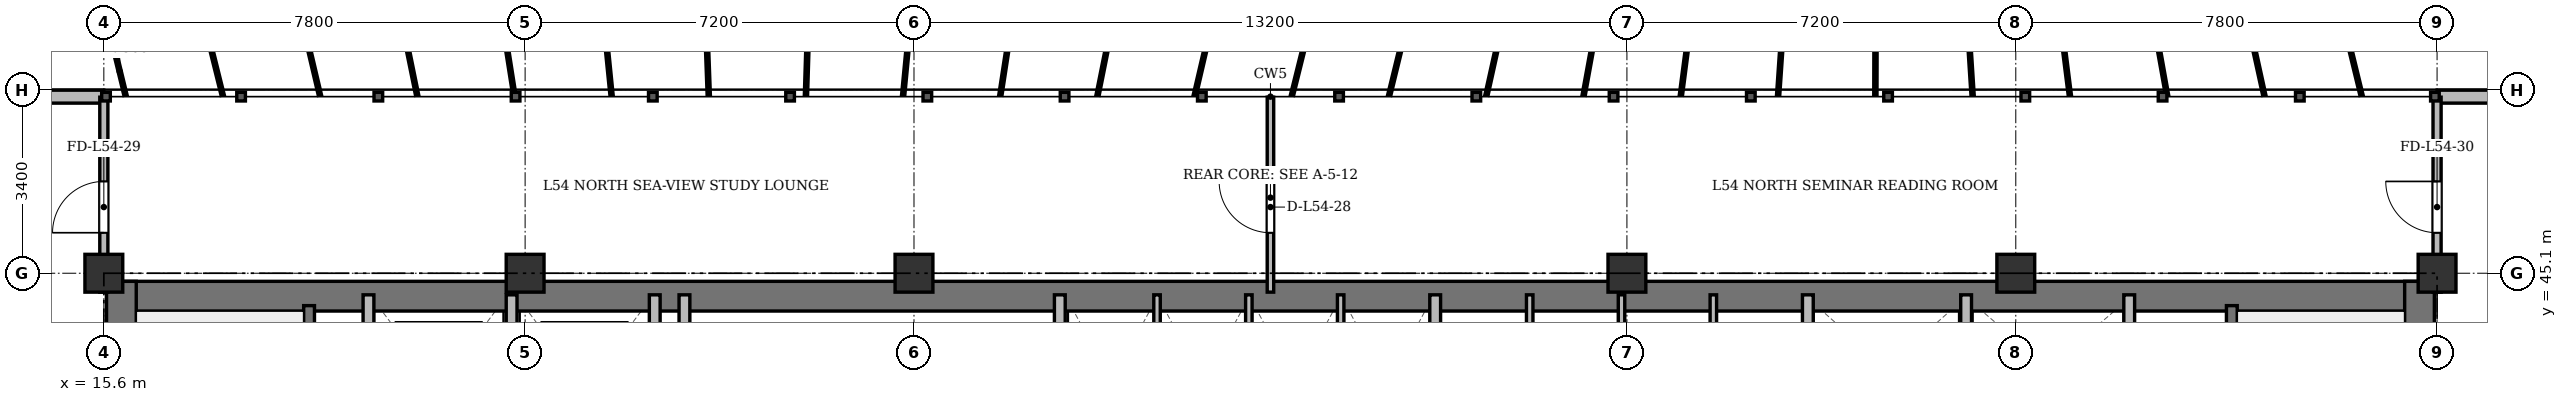
"""IFC4 building model, lengths in metres.
Left out: names, types, materials, properties, quantities, classifications, styles, units other than length and angle.
Written with IfcOpenShell. Run it as: python <this file> out.ifc"""

import sys

from ifc_helpers import new_model, si_unit, direction, frame, frame_2d, origin, origin_2d, place, context, subcontext, project, spatial, rectangle, extrude, source, transform, mapped, element, fill, save


model = new_model("IFC4")
c1 = context("Model", 3, precision=1e-05, world=origin(), true_north=direction((0.0, 1.0)))
c2 = subcontext(c1, "Body", "Model", "MODEL_VIEW")
j1 = project(units=[si_unit("LENGTHUNIT", "METRE"), si_unit("PLANEANGLEUNIT", "RADIAN")], contexts=[c1])
p1 = place(None, origin())
s1 = spatial("IfcSite", under=j1, at=p1, CompositionType="ELEMENT")
p2 = place(p1, origin())
s2 = spatial("IfcBuilding", under=s1, at=p2, CompositionType="ELEMENT")
p3 = place(p2, frame((0.0, 0.0, 208.5)))
s3 = spatial("IfcBuildingStorey", under=s2, at=p3, CompositionType="ELEMENT", Elevation=208.5)
m1 = source(origin(), c2, "Body", "SweptSolid", [
    extrude(rectangle(XDim=0.7, YDim=0.7, at=origin_2d()), origin(), (0.0, 0.0, 1.0), 3.6),
])
for number, where, z_axis, x_axis in (
    (1, (15.6, 45.1, 0.0), (0.0, 0.0, 1.0), (1.0, 0.0, 0.0)),
    (2, (23.4, 45.1, 0.0), (0.0, 0.0, 1.0), (1.0, 0.0, 0.0)),
    (3, (30.6, 45.1, 0.0), (0.0, 0.0, 1.0), (1.0, 0.0, 0.0)),
    (4, (43.8, 45.1, 0.0), (0.0, 0.0, 1.0), (1.0, 0.0, 0.0)),
    (5, (51.0, 45.1, 0.0), (0.0, 0.0, 1.0), (1.0, 0.0, 0.0)),
    (6, (58.8, 45.1, 0.0), (0.0, 0.0, 1.0), (1.0, 0.0, 0.0)),
):
    element("IfcColumn", number, at=place(p3, frame(where, z_axis=z_axis, x_axis=x_axis)), inside=s3, PredefinedType="COLUMN", context=c2, shape_type="MappedRepresentation", body=[
        mapped(m1, transform((0.0, 0.0, 0.0), x_axis=(1.0, 0.0, 0.0), y_axis=(0.0, 1.0, 0.0), z_axis=(0.0, 0.0, 1.0), scale=1.0)),
    ])
p4 = place(p3, frame((11.1, 48.37, 0.0), z_axis=(0.0, 0.0, 1.0), x_axis=(1.0, 0.0, 0.0)))
e7 = element("IfcWall", 7, at=p4, inside=s3, PredefinedType="SOLIDWALL", context=c2, shape_type="SweptSolid", body=[
    extrude(rectangle(XDim=4.5, YDim=0.24, at=frame_2d((2.25, 0.0))), origin(), (0.0, 0.0, 1.0), 3.36),
])
p5 = place(p4, frame((1.983, 0.0, 0.9)))
e8 = element("IfcOpeningElement", 8, at=p5, cuts=e7, PredefinedType="OPENING", context=c2, shape_type="SweptSolid", body=[
    extrude(rectangle(XDim=1.2, YDim=1.65, at=frame_2d((0.6, 0.825))), frame((0.0, 0.13, 0.0), z_axis=(0.0, -1.0, 0.0), x_axis=(1.0, 0.0, 0.0)), (0.0, 0.0, 1.0), 0.26),
])
p6 = place(p3, frame((58.8, 48.37, 0.0), z_axis=(0.0, 0.0, 1.0), x_axis=(1.0, 0.0, 0.0)))
e9 = element("IfcWall", 9, at=p6, inside=s3, PredefinedType="SOLIDWALL", context=c2, shape_type="SweptSolid", body=[
    extrude(rectangle(XDim=4.5, YDim=0.24, at=frame_2d((2.25, 0.0))), origin(), (0.0, 0.0, 1.0), 3.36),
])
p7 = place(p6, frame((1.318, 0.0, 0.9)))
e10 = element("IfcOpeningElement", 10, at=p7, cuts=e9, PredefinedType="OPENING", context=c2, shape_type="SweptSolid", body=[
    extrude(rectangle(XDim=1.2, YDim=1.65, at=frame_2d((0.6, 0.825))), frame((0.0, 0.13, 0.0), z_axis=(0.0, -1.0, 0.0), x_axis=(1.0, 0.0, 0.0)), (0.0, 0.0, 1.0), 0.26),
])
p8 = place(p3, frame((15.65, 44.675, 0.0), z_axis=(0.0, 0.0, 1.0), x_axis=(1.0, 0.0, 0.0)))
e11 = element("IfcWall", 11, at=p8, inside=s3, PredefinedType="SHEAR", context=c2, shape_type="SweptSolid", body=[
    extrude(rectangle(XDim=43.1, YDim=0.55, at=frame_2d((21.55, 0.0))), origin(), (0.0, 0.0, 1.0), 3.36),
])
for number, where, z_axis, x_axis in (
    (12, (15.925, 33.4, 0.0), (0.0, 0.0, 1.0), (0.0, 1.0, 0.0)),
    (13, (58.475, 33.4, 0.0), (0.0, 0.0, 1.0), (0.0, 1.0, 0.0)),
):
    element("IfcWall", number, at=place(p3, frame(where, z_axis=z_axis, x_axis=x_axis)), inside=s3, PredefinedType="SHEAR", context=c2, shape_type="SweptSolid", body=[
        extrude(rectangle(XDim=11.55, YDim=0.55, at=frame_2d((5.775, 0.0))), origin(), (0.0, 0.0, 1.0), 3.36),
    ])
p9 = place(p3, frame((19.4, 33.4, 0.0), z_axis=(0.0, 0.0, 1.0), x_axis=(0.0, 1.0, 0.0)))
e14 = element("IfcWall", 14, at=p9, inside=s3, PredefinedType="SHEAR", context=c2, shape_type="SweptSolid", body=[
    extrude(rectangle(XDim=11.1, YDim=0.2, at=frame_2d((5.55, 0.0))), origin(), (0.0, 0.0, 1.0), 3.36),
])
p10 = place(p9, frame((0.85, 0.0, 0.0)))
e15 = element("IfcOpeningElement", 15, at=p10, cuts=e14, PredefinedType="OPENING", context=c2, shape_type="SweptSolid", body=[
    extrude(rectangle(XDim=1.1, YDim=2.15, at=frame_2d((0.55, 1.075))), frame((0.0, 0.11, 0.0), z_axis=(0.0, -1.0, 0.0), x_axis=(1.0, 0.0, 0.0)), (0.0, 0.0, 1.0), 0.22),
])
p11 = place(p3, frame((55.0, 33.4, 0.0), z_axis=(0.0, 0.0, 1.0), x_axis=(0.0, 1.0, 0.0)))
e16 = element("IfcWall", 16, at=p11, inside=s3, PredefinedType="SHEAR", context=c2, shape_type="SweptSolid", body=[
    extrude(rectangle(XDim=11.1, YDim=0.2, at=frame_2d((5.55, 0.0))), origin(), (0.0, 0.0, 1.0), 3.36),
])
p12 = place(p11, frame((0.85, 0.0, 0.0)))
e17 = element("IfcOpeningElement", 17, at=p12, cuts=e16, PredefinedType="OPENING", context=c2, shape_type="SweptSolid", body=[
    extrude(rectangle(XDim=1.1, YDim=2.15, at=frame_2d((0.55, 1.075))), frame((0.0, 0.11, 0.0), z_axis=(0.0, -1.0, 0.0), x_axis=(1.0, 0.0, 0.0)), (0.0, 0.0, 1.0), 0.22),
])
for number, where, z_axis, x_axis in (
    (18, (20.5, 41.3, 0.0), (0.0, 0.0, 1.0), (0.0, 1.0, 0.0)),
    (19, (23.15, 41.3, 0.0), (0.0, 0.0, 1.0), (0.0, 1.0, 0.0)),
    (20, (25.8, 41.3, 0.0), (0.0, 0.0, 1.0), (0.0, 1.0, 0.0)),
):
    element("IfcWall", number, at=place(p3, frame(where, z_axis=z_axis, x_axis=x_axis)), inside=s3, PredefinedType="SOLIDWALL", context=c2, shape_type="SweptSolid", body=[
        extrude(rectangle(XDim=3.4, YDim=0.2, at=frame_2d((1.7, 0.0))), origin(), (0.0, 0.0, 1.0), 3.36),
    ])
for number, where, z_axis, x_axis in (
    (21, (26.35, 33.4, 0.0), (0.0, 0.0, 1.0), (0.0, 1.0, 0.0)),
    (22, (33.3, 33.4, 0.0), (0.0, 0.0, 1.0), (0.0, 1.0, 0.0)),
):
    element("IfcWall", number, at=place(p3, frame(where, z_axis=z_axis, x_axis=x_axis)), inside=s3, PredefinedType="SOLIDWALL", context=c2, shape_type="SweptSolid", body=[
        extrude(rectangle(XDim=11.3, YDim=0.2, at=frame_2d((5.65, 0.0))), origin(), (0.0, 0.0, 1.0), 2.91),
    ])
for number, where, z_axis, x_axis in (
    (23, (35.1, 41.5, 0.0), (0.0, 0.0, 1.0), (0.0, 1.0, 0.0)),
    (24, (36.8, 41.5, 0.0), (0.0, 0.0, 1.0), (0.0, 1.0, 0.0)),
    (25, (38.5, 41.5, 0.0), (0.0, 0.0, 1.0), (0.0, 1.0, 0.0)),
):
    element("IfcWall", number, at=place(p3, frame(where, z_axis=z_axis, x_axis=x_axis)), inside=s3, PredefinedType="PARTITIONING", context=c2, shape_type="SweptSolid", body=[
        extrude(rectangle(XDim=3.2, YDim=0.12, at=frame_2d((1.6, 0.0))), origin(), (0.0, 0.0, 1.0), 3.36),
    ])
p13 = place(p3, frame((40.25, 41.5, 0.0), z_axis=(0.0, 0.0, 1.0), x_axis=(0.0, 1.0, 0.0)))
e26 = element("IfcWall", 26, at=p13, inside=s3, PredefinedType="SOLIDWALL", context=c2, shape_type="SweptSolid", body=[
    extrude(rectangle(XDim=3.2, YDim=0.2, at=frame_2d((1.6, 0.0))), origin(), (0.0, 0.0, 1.0), 3.36),
])
p14 = place(p3, frame((42.0, 41.5, 0.0), z_axis=(0.0, 0.0, 1.0), x_axis=(0.0, 1.0, 0.0)))
e27 = element("IfcWall", 27, at=p14, inside=s3, PredefinedType="PARTITIONING", context=c2, shape_type="SweptSolid", body=[
    extrude(rectangle(XDim=3.2, YDim=0.12, at=frame_2d((1.6, 0.0))), origin(), (0.0, 0.0, 1.0), 3.36),
])
p15 = place(p3, frame((43.7, 41.5, 0.0), z_axis=(0.0, 0.0, 1.0), x_axis=(0.0, 1.0, 0.0)))
e28 = element("IfcWall", 28, at=p15, inside=s3, PredefinedType="PARTITIONING", context=c2, shape_type="SweptSolid", body=[
    extrude(rectangle(XDim=3.2, YDim=0.12, at=frame_2d((1.6, 0.0))), origin(), (0.0, 0.0, 1.0), 2.86),
])
p16 = place(p3, frame((45.4, 41.5, 0.0), z_axis=(0.0, 0.0, 1.0), x_axis=(0.0, 1.0, 0.0)))
e29 = element("IfcWall", 29, at=p16, inside=s3, PredefinedType="PARTITIONING", context=c2, shape_type="SweptSolid", body=[
    extrude(rectangle(XDim=3.2, YDim=0.12, at=frame_2d((1.6, 0.0))), origin(), (0.0, 0.0, 1.0), 3.36),
])
p17 = place(p3, frame((47.15, 33.4, 0.0), z_axis=(0.0, 0.0, 1.0), x_axis=(0.0, 1.0, 0.0)))
e30 = element("IfcWall", 30, at=p17, inside=s3, PredefinedType="SOLIDWALL", context=c2, shape_type="SweptSolid", body=[
    extrude(rectangle(XDim=11.3, YDim=0.2, at=frame_2d((5.65, 0.0))), origin(), (0.0, 0.0, 1.0), 2.91),
])
for number, where, z_axis, x_axis in (
    (31, (50.08, 42.05, 0.0), (0.0, 0.0, 1.0), (0.0, 1.0, 0.0)),
    (32, (53.1, 42.05, 0.0), (0.0, 0.0, 1.0), (0.0, 1.0, 0.0)),
):
    element("IfcWall", number, at=place(p3, frame(where, z_axis=z_axis, x_axis=x_axis)), inside=s3, PredefinedType="SOLIDWALL", context=c2, shape_type="SweptSolid", body=[
        extrude(rectangle(XDim=2.65, YDim=0.2, at=frame_2d((1.325, 0.0))), origin(), (0.0, 0.0, 1.0), 3.36),
    ])
p18 = place(p3, frame((37.2, 44.75, 0.0), z_axis=(0.0, 0.0, 1.0), x_axis=(0.0, 1.0, 0.0)))
e33 = element("IfcWall", 33, at=p18, inside=s3, PredefinedType="PARTITIONING", context=c2, shape_type="SweptSolid", body=[
    extrude(rectangle(XDim=3.61, YDim=0.12, at=frame_2d((1.805, 0.0))), origin(), (0.0, 0.0, 1.0), 2.91),
])
p19 = place(p18, frame((1.1, 0.0, 0.0)))
e34 = element("IfcOpeningElement", 34, at=p19, cuts=e33, PredefinedType="OPENING", context=c2, shape_type="SweptSolid", body=[
    extrude(rectangle(XDim=0.95, YDim=2.15, at=frame_2d((0.475, 1.075))), frame((0.0, 0.07, 0.0), z_axis=(0.0, -1.0, 0.0), x_axis=(1.0, 0.0, 0.0)), (0.0, 0.0, 1.0), 0.14),
])
p20 = place(p3, frame((15.6, 44.75, 0.0), z_axis=(0.0, 0.0, 1.0), x_axis=(0.0, 1.0, 0.0)))
e35 = element("IfcWall", 35, at=p20, inside=s3, PredefinedType="PARTITIONING", context=c2, shape_type="SweptSolid", body=[
    extrude(rectangle(XDim=3.61, YDim=0.15, at=frame_2d((1.805, 0.0))), origin(), (0.0, 0.0, 1.0), 2.86),
])
p21 = place(p20, frame((1.1, 0.0, 0.0)))
e36 = element("IfcOpeningElement", 36, at=p21, cuts=e35, PredefinedType="OPENING", context=c2, shape_type="SweptSolid", body=[
    extrude(rectangle(XDim=0.95, YDim=2.15, at=frame_2d((0.475, 1.075))), frame((0.0, 0.085, 0.0), z_axis=(0.0, -1.0, 0.0), x_axis=(1.0, 0.0, 0.0)), (0.0, 0.0, 1.0), 0.17),
])
p22 = place(p3, frame((58.8, 44.75, 0.0), z_axis=(0.0, 0.0, 1.0), x_axis=(0.0, 1.0, 0.0)))
e37 = element("IfcWall", 37, at=p22, inside=s3, PredefinedType="PARTITIONING", context=c2, shape_type="SweptSolid", body=[
    extrude(rectangle(XDim=3.61, YDim=0.15, at=frame_2d((1.805, 0.0))), origin(), (0.0, 0.0, 1.0), 2.86),
])
p23 = place(p22, frame((1.1, 0.0, 0.0)))
e38 = element("IfcOpeningElement", 38, at=p23, cuts=e37, PredefinedType="OPENING", context=c2, shape_type="SweptSolid", body=[
    extrude(rectangle(XDim=0.95, YDim=2.15, at=frame_2d((0.475, 1.075))), frame((0.0, 0.085, 0.0), z_axis=(0.0, -1.0, 0.0), x_axis=(1.0, 0.0, 0.0)), (0.0, 0.0, 1.0), 0.17),
])
m2 = source(origin(), c2, "Body", "SweptSolid", [
    extrude(rectangle(XDim=0.95, YDim=2.15, at=frame_2d((0.475, 1.075))), frame((0.0, 0.025, 0.0), z_axis=(0.0, -1.0, 0.0), x_axis=(1.0, 0.0, 0.0)), (0.0, 0.0, 1.0), 0.05),
])
p24 = place(p19, origin())
e39 = element("IfcDoor", 39, at=p24, inside=s3, OperationType="SINGLE_SWING_RIGHT", PredefinedType="DOOR", context=c2, shape_type="MappedRepresentation", body=[
    mapped(m2, transform((0.0, 0.0, 0.0), x_axis=(1.0, 0.0, 0.0), y_axis=(0.0, 1.0, 0.0), z_axis=(0.0, 0.0, 1.0), scale=1.0)),
])
fill(e34, e39)
p25 = place(p21, origin())
e40 = element("IfcDoor", 40, at=p25, inside=s3, OperationType="SINGLE_SWING_LEFT", PredefinedType="DOOR", context=c2, shape_type="MappedRepresentation", body=[
    mapped(m2, transform((0.0, 0.0, 0.0), x_axis=(1.0, 0.0, 0.0), y_axis=(0.0, 1.0, 0.0), z_axis=(0.0, 0.0, 1.0), scale=1.0)),
])
fill(e36, e40)
p26 = place(p23, origin())
e41 = element("IfcDoor", 41, at=p26, inside=s3, OperationType="SINGLE_SWING_RIGHT", PredefinedType="DOOR", context=c2, shape_type="MappedRepresentation", body=[
    mapped(m2, transform((0.0, 0.0, 0.0), x_axis=(1.0, 0.0, 0.0), y_axis=(0.0, 1.0, 0.0), z_axis=(0.0, 0.0, 1.0), scale=1.0)),
])
fill(e38, e41)
save(model, sys.argv[1])
